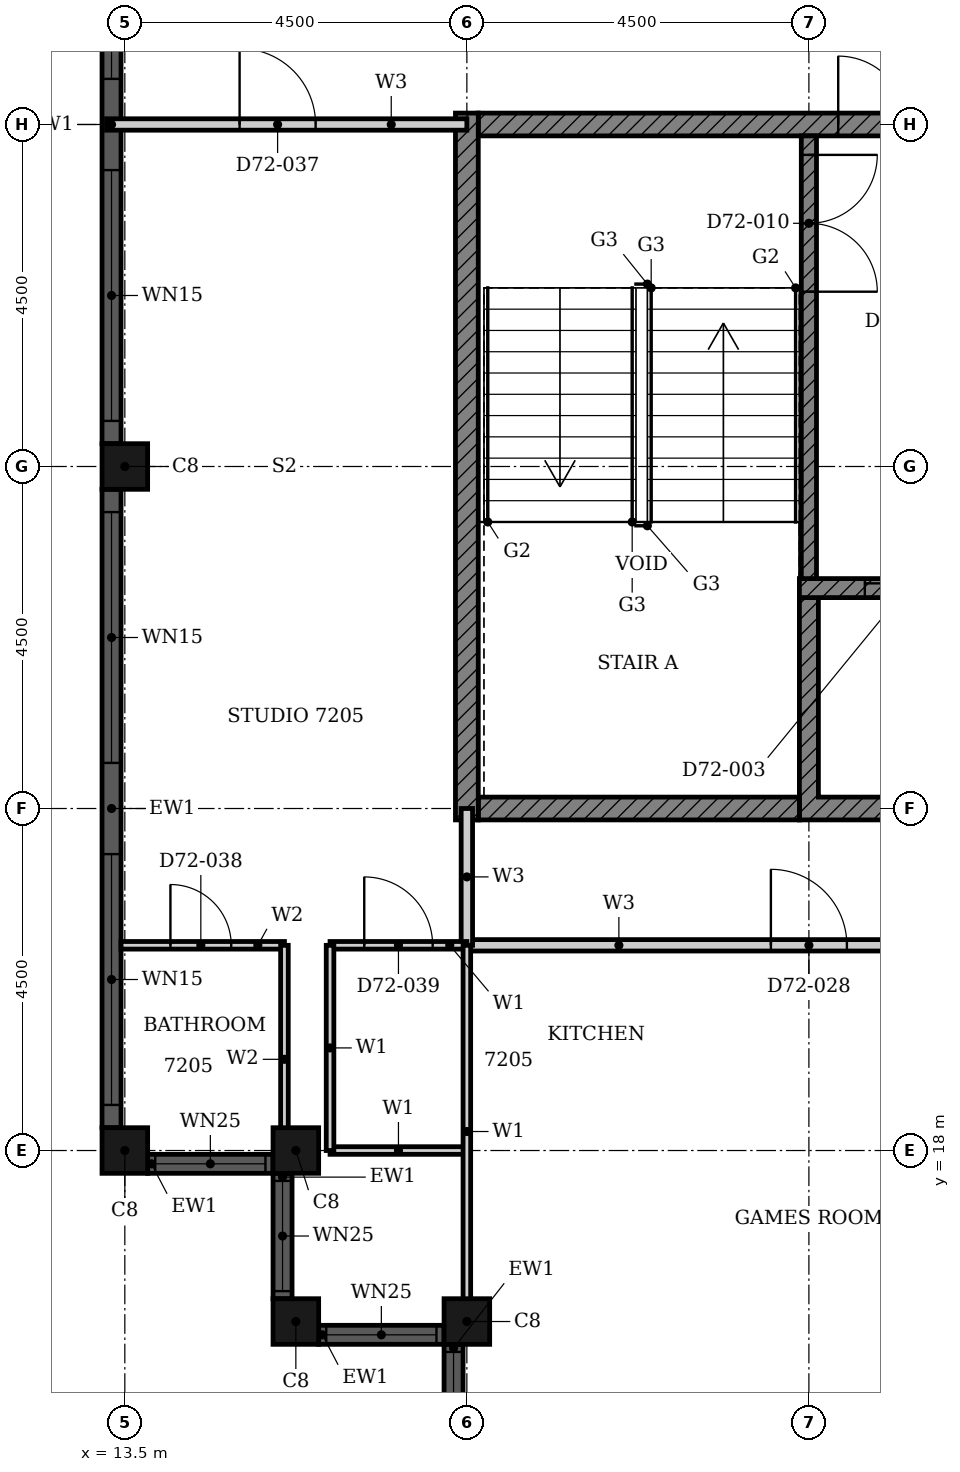
"""IFC4 building model, lengths in metres.
Left out: names, types, materials, properties, quantities, classifications, styles, units other than length and angle.
Written with IfcOpenShell. Run it as: python <this file> out.ifc"""

import sys

from ifc_helpers import new_model, si_unit, direction, frame, frame_2d, origin, origin_2d, place, context, subcontext, project, spatial, polyline, rectangle, hollow_rectangle, outline, extrude, element, fill, save


model = new_model("IFC4")
c1 = context("Model", 3, precision=1e-05, world=origin(), true_north=direction((0.0, 1.0)))
c2 = subcontext(c1, "Body", "Model", "MODEL_VIEW")
j1 = project(units=[si_unit("LENGTHUNIT", "METRE"), si_unit("PLANEANGLEUNIT", "RADIAN")], contexts=[c1])
p1 = place(None, origin())
s1 = spatial("IfcSite", under=j1, at=p1, CompositionType="ELEMENT")
p2 = place(p1, origin())
s2 = spatial("IfcBuilding", under=s1, at=p2, CompositionType="ELEMENT")
p3 = place(p2, frame((0.0, 0.0, 283.4)))
s3 = spatial("IfcBuildingStorey", under=s2, at=p3, CompositionType="ELEMENT", Elevation=283.4)
for number, where, z_axis, x_axis in (
    (1, (13.5, 27.0, 0.0), (0.0, 0.0, 1.0), (1.0, 0.0, 0.0)),
    (2, (13.5, 18.0, 0.0), (0.0, 0.0, 1.0), (1.0, 0.0, 0.0)),
    (3, (15.75, 18.0, 0.0), (0.0, 0.0, 1.0), (1.0, 0.0, 0.0)),
    (4, (15.75, 15.75, 0.0), (0.0, 0.0, 1.0), (1.0, 0.0, 0.0)),
    (5, (18.0, 15.75, 0.0), (0.0, 0.0, 1.0), (1.0, 0.0, 0.0)),
):
    element("IfcColumn", number, at=place(p3, frame(where, z_axis=z_axis, x_axis=x_axis)), inside=s3, PredefinedType="COLUMN", context=c2, shape_type="SweptSolid", body=[
        extrude(hollow_rectangle(XDim=0.6, YDim=0.6, WallThickness=0.02, at=origin_2d()), origin(), (0.0, 0.0, 1.0), 3.7),
    ])
p4 = place(p3, frame((13.325, 35.7, 0.0), z_axis=(0.0, 0.0, 1.0), x_axis=(0.0, -1.0, 0.0)))
e6 = element("IfcWall", 6, at=p4, inside=s3, PredefinedType="SOLIDWALL", context=c2, shape_type="SweptSolid", body=[
    extrude(rectangle(XDim=8.4, YDim=0.25, at=frame_2d((4.2, 0.0))), origin(), (0.0, 0.0, 1.0), 3.7),
])
p5 = place(p4, frame((0.3, 0.0, 0.45)))
e7 = element("IfcOpeningElement", 7, at=p5, cuts=e6, PredefinedType="OPENING", context=c2, shape_type="SweptSolid", body=[
    extrude(rectangle(XDim=3.3, YDim=2.3, at=frame_2d((1.65, 1.15))), frame((0.0, 0.135, 0.0), z_axis=(0.0, -1.0, 0.0), x_axis=(1.0, 0.0, 0.0)), (0.0, 0.0, 1.0), 0.27),
])
p6 = place(p4, frame((4.8, 0.0, 0.45)))
e8 = element("IfcOpeningElement", 8, at=p6, cuts=e6, PredefinedType="OPENING", context=c2, shape_type="SweptSolid", body=[
    extrude(rectangle(XDim=3.3, YDim=2.3, at=frame_2d((1.65, 1.15))), frame((0.0, 0.135, 0.0), z_axis=(0.0, -1.0, 0.0), x_axis=(1.0, 0.0, 0.0)), (0.0, 0.0, 1.0), 0.27),
])
p7 = place(p3, frame((13.325, 26.7, 0.0), z_axis=(0.0, 0.0, 1.0), x_axis=(0.0, -1.0, 0.0)))
e9 = element("IfcWall", 9, at=p7, inside=s3, PredefinedType="SOLIDWALL", context=c2, shape_type="SweptSolid", body=[
    extrude(rectangle(XDim=8.4, YDim=0.25, at=frame_2d((4.2, 0.0))), origin(), (0.0, 0.0, 1.0), 3.7),
])
p8 = place(p7, frame((0.3, 0.0, 0.45)))
e10 = element("IfcOpeningElement", 10, at=p8, cuts=e9, PredefinedType="OPENING", context=c2, shape_type="SweptSolid", body=[
    extrude(rectangle(XDim=3.3, YDim=2.3, at=frame_2d((1.65, 1.15))), frame((0.0, 0.135, 0.0), z_axis=(0.0, -1.0, 0.0), x_axis=(1.0, 0.0, 0.0)), (0.0, 0.0, 1.0), 0.27),
])
p9 = place(p7, frame((4.8, 0.0, 0.45)))
e11 = element("IfcOpeningElement", 11, at=p9, cuts=e9, PredefinedType="OPENING", context=c2, shape_type="SweptSolid", body=[
    extrude(rectangle(XDim=3.3, YDim=2.3, at=frame_2d((1.65, 1.15))), frame((0.0, 0.135, 0.0), z_axis=(0.0, -1.0, 0.0), x_axis=(1.0, 0.0, 0.0)), (0.0, 0.0, 1.0), 0.27),
])
p10 = place(p3, frame((13.8, 17.825, 0.0), z_axis=(0.0, 0.0, 1.0), x_axis=(1.0, 0.0, 0.0)))
e12 = element("IfcWall", 12, at=p10, inside=s3, PredefinedType="SOLIDWALL", context=c2, shape_type="SweptSolid", body=[
    extrude(rectangle(XDim=1.65, YDim=0.25, at=frame_2d((0.825, 0.0))), origin(), (0.0, 0.0, 1.0), 3.7),
])
p11 = place(p10, frame((0.1, 0.0, 0.9)))
e13 = element("IfcOpeningElement", 13, at=p11, cuts=e12, PredefinedType="OPENING", context=c2, shape_type="SweptSolid", body=[
    extrude(rectangle(XDim=1.45, YDim=1.85, at=frame_2d((0.725, 0.925))), frame((0.0, 0.135, 0.0), z_axis=(0.0, -1.0, 0.0), x_axis=(1.0, 0.0, 0.0)), (0.0, 0.0, 1.0), 0.27),
])
p12 = place(p3, frame((15.575, 17.7, 0.0), z_axis=(0.0, 0.0, 1.0), x_axis=(0.0, -1.0, 0.0)))
e14 = element("IfcWall", 14, at=p12, inside=s3, PredefinedType="SOLIDWALL", context=c2, shape_type="SweptSolid", body=[
    extrude(rectangle(XDim=1.65, YDim=0.25, at=frame_2d((0.825, 0.0))), origin(), (0.0, 0.0, 1.0), 3.7),
])
p13 = place(p12, frame((0.1, 0.0, 0.9)))
e15 = element("IfcOpeningElement", 15, at=p13, cuts=e14, PredefinedType="OPENING", context=c2, shape_type="SweptSolid", body=[
    extrude(rectangle(XDim=1.45, YDim=1.85, at=frame_2d((0.725, 0.925))), frame((0.0, 0.135, 0.0), z_axis=(0.0, -1.0, 0.0), x_axis=(1.0, 0.0, 0.0)), (0.0, 0.0, 1.0), 0.27),
])
p14 = place(p3, frame((16.05, 15.575, 0.0), z_axis=(0.0, 0.0, 1.0), x_axis=(1.0, 0.0, 0.0)))
e16 = element("IfcWall", 16, at=p14, inside=s3, PredefinedType="SOLIDWALL", context=c2, shape_type="SweptSolid", body=[
    extrude(rectangle(XDim=1.65, YDim=0.25, at=frame_2d((0.825, 0.0))), origin(), (0.0, 0.0, 1.0), 3.7),
])
p15 = place(p14, frame((0.1, 0.0, 0.9)))
e17 = element("IfcOpeningElement", 17, at=p15, cuts=e16, PredefinedType="OPENING", context=c2, shape_type="SweptSolid", body=[
    extrude(rectangle(XDim=1.45, YDim=1.85, at=frame_2d((0.725, 0.925))), frame((0.0, 0.135, 0.0), z_axis=(0.0, -1.0, 0.0), x_axis=(1.0, 0.0, 0.0)), (0.0, 0.0, 1.0), 0.27),
])
p16 = place(p3, frame((17.825, 15.45, 0.0), z_axis=(0.0, 0.0, 1.0), x_axis=(0.0, -1.0, 0.0)))
e18 = element("IfcWall", 18, at=p16, inside=s3, PredefinedType="SOLIDWALL", context=c2, shape_type="SweptSolid", body=[
    extrude(rectangle(XDim=1.65, YDim=0.25, at=frame_2d((0.825, 0.0))), origin(), (0.0, 0.0, 1.0), 3.7),
])
p17 = place(p16, frame((0.1, 0.0, 0.9)))
e19 = element("IfcOpeningElement", 19, at=p17, cuts=e18, PredefinedType="OPENING", context=c2, shape_type="SweptSolid", body=[
    extrude(rectangle(XDim=1.45, YDim=1.85, at=frame_2d((0.725, 0.925))), frame((0.0, 0.135, 0.0), z_axis=(0.0, -1.0, 0.0), x_axis=(1.0, 0.0, 0.0)), (0.0, 0.0, 1.0), 0.27),
])
p18 = place(p3, origin())
e20 = element("IfcWall", 20, at=p18, inside=s3, PredefinedType="SHEAR", context=c2, shape_type="SweptSolid", body=[
    extrude(outline(polyline([(22.375, 22.35), (25.197, 22.35), (25.197, 25.275), (24.947, 25.275), (24.947, 22.65), (22.625, 22.65), (22.625, 25.275), (22.375, 25.275), (22.375, 22.35)])), origin(), (0.0, 0.0, 1.0), 3.4),
])
p19 = place(p3, frame((18.15, 22.5, 0.0), z_axis=(0.0, 0.0, 1.0), x_axis=(1.0, 0.0, 0.0)))
e21 = element("IfcWall", 21, at=p19, inside=s3, PredefinedType="SHEAR", context=c2, shape_type="SweptSolid", body=[
    extrude(rectangle(XDim=4.225, YDim=0.3, at=frame_2d((2.113, 0.0))), origin(), (0.0, 0.0, 1.0), 3.4),
])
p20 = place(p3, frame((18.15, 31.5, 0.0), z_axis=(0.0, 0.0, 1.0), x_axis=(1.0, 0.0, 0.0)))
e22 = element("IfcWall", 22, at=p20, inside=s3, PredefinedType="SHEAR", context=c2, shape_type="SweptSolid", body=[
    extrude(rectangle(XDim=9.368, YDim=0.3, at=frame_2d((4.684, 0.0))), origin(), (0.0, 0.0, 1.0), 3.4),
])
p21 = place(p20, frame((4.736, 0.0, 0.0)))
e23 = element("IfcOpeningElement", 23, at=p21, cuts=e22, PredefinedType="OPENING", context=c2, shape_type="SweptSolid", body=[
    extrude(rectangle(XDim=1.8, YDim=2.1, at=frame_2d((0.9, 1.05))), frame((0.0, 0.16, 0.0), z_axis=(0.0, -1.0, 0.0), x_axis=(1.0, 0.0, 0.0)), (0.0, 0.0, 1.0), 0.32),
])
p22 = place(p3, frame((18.0, 22.35, 0.0), z_axis=(0.0, 0.0, 1.0), x_axis=(0.0, 1.0, 0.0)))
e24 = element("IfcWall", 24, at=p22, inside=s3, PredefinedType="SHEAR", context=c2, shape_type="SweptSolid", body=[
    extrude(rectangle(XDim=9.3, YDim=0.3, at=frame_2d((4.65, 0.0))), origin(), (0.0, 0.0, 1.0), 3.4),
])
p23 = place(p3, frame((22.375, 25.4, 0.0), z_axis=(0.0, 0.0, 1.0), x_axis=(1.0, 0.0, 0.0)))
e25 = element("IfcWall", 25, at=p23, inside=s3, PredefinedType="SHEAR", context=c2, shape_type="SweptSolid", body=[
    extrude(rectangle(XDim=15.678, YDim=0.25, at=frame_2d((7.839, 0.0))), origin(), (0.0, 0.0, 1.0), 3.4),
])
p24 = place(p23, frame((6.004, 0.0, 0.0)))
e26 = element("IfcOpeningElement", 26, at=p24, cuts=e25, PredefinedType="OPENING", context=c2, shape_type="SweptSolid", body=[
    extrude(rectangle(XDim=1.1, YDim=2.1, at=frame_2d((0.55, 1.05))), frame((0.0, 0.135, 0.0), z_axis=(0.0, -1.0, 0.0), x_axis=(1.0, 0.0, 0.0)), (0.0, 0.0, 1.0), 0.27),
])
p25 = place(p23, frame((0.861, 0.0, 0.0)))
e27 = element("IfcOpeningElement", 27, at=p25, cuts=e25, PredefinedType="OPENING", context=c2, shape_type="SweptSolid", body=[
    extrude(rectangle(XDim=1.1, YDim=2.1, at=frame_2d((0.55, 1.05))), frame((0.0, 0.135, 0.0), z_axis=(0.0, -1.0, 0.0), x_axis=(1.0, 0.0, 0.0)), (0.0, 0.0, 1.0), 0.27),
])
p26 = place(p23, frame((3.532, 0.0, 0.0)))
e28 = element("IfcOpeningElement", 28, at=p26, cuts=e25, PredefinedType="OPENING", context=c2, shape_type="SweptSolid", body=[
    extrude(rectangle(XDim=0.9, YDim=2.1, at=frame_2d((0.45, 1.05))), frame((0.0, 0.135, 0.0), z_axis=(0.0, -1.0, 0.0), x_axis=(1.0, 0.0, 0.0)), (0.0, 0.0, 1.0), 0.27),
])
p27 = place(p23, frame((11.246, 0.0, 0.0)))
e29 = element("IfcOpeningElement", 29, at=p27, cuts=e25, PredefinedType="OPENING", context=c2, shape_type="SweptSolid", body=[
    extrude(rectangle(XDim=0.9, YDim=2.1, at=frame_2d((0.45, 1.05))), frame((0.0, 0.135, 0.0), z_axis=(0.0, -1.0, 0.0), x_axis=(1.0, 0.0, 0.0)), (0.0, 0.0, 1.0), 0.27),
])
p28 = place(p3, frame((22.5, 31.35, 0.0), z_axis=(0.0, 0.0, 1.0), x_axis=(0.0, -1.0, 0.0)))
e30 = element("IfcWall", 30, at=p28, inside=s3, PredefinedType="SHEAR", context=c2, shape_type="SweptSolid", body=[
    extrude(rectangle(XDim=5.825, YDim=0.2, at=frame_2d((2.913, 0.0))), origin(), (0.0, 0.0, 1.0), 3.4),
])
p29 = place(p28, frame((0.25, 0.0, 0.0)))
e31 = element("IfcOpeningElement", 31, at=p29, cuts=e30, PredefinedType="OPENING", context=c2, shape_type="SweptSolid", body=[
    extrude(rectangle(XDim=1.8, YDim=2.1, at=frame_2d((0.9, 1.05))), frame((0.0, 0.11, 0.0), z_axis=(0.0, -1.0, 0.0), x_axis=(1.0, 0.0, 0.0)), (0.0, 0.0, 1.0), 0.22),
])
p30 = place(p3, frame((18.0, 20.7, 0.0), z_axis=(0.0, 0.0, 1.0), x_axis=(1.0, 0.0, 0.0)))
e32 = element("IfcWall", 32, at=p30, inside=s3, PredefinedType="PARTITIONING", context=c2, shape_type="SweptSolid", body=[
    extrude(rectangle(XDim=9.0, YDim=0.15, at=frame_2d((4.5, 0.0))), origin(), (0.0, 0.0, 1.0), 3.4),
])
p31 = place(p30, frame((4.0, 0.0, 0.0)))
e33 = element("IfcOpeningElement", 33, at=p31, cuts=e32, PredefinedType="OPENING", context=c2, shape_type="SweptSolid", body=[
    extrude(rectangle(XDim=1.0, YDim=2.1, at=frame_2d((0.5, 1.05))), frame((0.0, 0.085, 0.0), z_axis=(0.0, -1.0, 0.0), x_axis=(1.0, 0.0, 0.0)), (0.0, 0.0, 1.0), 0.17),
])
p32 = place(p3, frame((13.26, 31.5, 0.0), z_axis=(0.0, 0.0, 1.0), x_axis=(1.0, 0.0, 0.0)))
e34 = element("IfcWall", 34, at=p32, inside=s3, PredefinedType="PARTITIONING", context=c2, shape_type="SweptSolid", body=[
    extrude(rectangle(XDim=4.74, YDim=0.15, at=frame_2d((2.37, 0.0))), origin(), (0.0, 0.0, 1.0), 3.4),
])
p33 = place(p32, frame((1.75, 0.0, 0.0)))
e35 = element("IfcOpeningElement", 35, at=p33, cuts=e34, PredefinedType="OPENING", context=c2, shape_type="SweptSolid", body=[
    extrude(rectangle(XDim=1.0, YDim=2.2, at=frame_2d((0.5, 1.1))), frame((0.0, 0.085, 0.0), z_axis=(0.0, -1.0, 0.0), x_axis=(1.0, 0.0, 0.0)), (0.0, 0.0, 1.0), 0.17),
])
p34 = place(p3, frame((18.0, 20.7, 0.0), z_axis=(0.0, 0.0, 1.0), x_axis=(0.0, 1.0, 0.0)))
e36 = element("IfcWall", 36, at=p34, inside=s3, PredefinedType="PARTITIONING", context=c2, shape_type="SweptSolid", body=[
    extrude(rectangle(XDim=1.8, YDim=0.15, at=frame_2d((0.9, 0.0))), origin(), (0.0, 0.0, 1.0), 3.4),
])
p35 = place(p3, frame((16.2, 18.0, 0.0), z_axis=(0.0, 0.0, 1.0), x_axis=(1.0, 0.0, 0.0)))
e37 = element("IfcWall", 37, at=p35, inside=s3, PredefinedType="PARTITIONING", context=c2, shape_type="SweptSolid", body=[
    extrude(rectangle(XDim=1.8, YDim=0.1, at=frame_2d((0.9, 0.0))), origin(), (0.0, 0.0, 1.0), 3.4),
])
p36 = place(p3, frame((16.2, 20.7, 0.0), z_axis=(0.0, 0.0, 1.0), x_axis=(1.0, 0.0, 0.0)))
e38 = element("IfcWall", 38, at=p36, inside=s3, PredefinedType="PARTITIONING", context=c2, shape_type="SweptSolid", body=[
    extrude(rectangle(XDim=1.8, YDim=0.1, at=frame_2d((0.9, 0.0))), origin(), (0.0, 0.0, 1.0), 3.4),
])
p37 = place(p36, frame((0.45, 0.0, 0.0)))
e39 = element("IfcOpeningElement", 39, at=p37, cuts=e38, PredefinedType="OPENING", context=c2, shape_type="SweptSolid", body=[
    extrude(rectangle(XDim=0.9, YDim=2.1, at=frame_2d((0.45, 1.05))), frame((0.0, 0.06, 0.0), z_axis=(0.0, -1.0, 0.0), x_axis=(1.0, 0.0, 0.0)), (0.0, 0.0, 1.0), 0.12),
])
p38 = place(p3, frame((16.2, 18.0, 0.0), z_axis=(0.0, 0.0, 1.0), x_axis=(0.0, 1.0, 0.0)))
e40 = element("IfcWall", 40, at=p38, inside=s3, PredefinedType="PARTITIONING", context=c2, shape_type="SweptSolid", body=[
    extrude(rectangle(XDim=2.7, YDim=0.1, at=frame_2d((1.35, 0.0))), origin(), (0.0, 0.0, 1.0), 3.4),
])
p39 = place(p3, frame((18.0, 15.8, 0.0), z_axis=(0.0, 0.0, 1.0), x_axis=(0.0, 1.0, 0.0)))
e41 = element("IfcWall", 41, at=p39, inside=s3, PredefinedType="PARTITIONING", context=c2, shape_type="SweptSolid", body=[
    extrude(rectangle(XDim=4.9, YDim=0.1, at=frame_2d((2.45, 0.0))), origin(), (0.0, 0.0, 1.0), 3.4),
])
p40 = place(p3, frame((13.45, 20.7, 0.0), z_axis=(0.0, 0.0, 1.0), x_axis=(1.0, 0.0, 0.0)))
e42 = element("IfcWall", 42, at=p40, inside=s3, PredefinedType="PARTITIONING", context=c2, shape_type="SweptSolid", body=[
    extrude(rectangle(XDim=2.15, YDim=0.1, at=frame_2d((1.075, 0.0))), origin(), (0.0, 0.0, 1.0), 3.4),
])
p41 = place(p40, frame((0.65, 0.0, 0.0)))
e43 = element("IfcOpeningElement", 43, at=p41, cuts=e42, PredefinedType="OPENING", context=c2, shape_type="SweptSolid", body=[
    extrude(rectangle(XDim=0.8, YDim=2.1, at=frame_2d((0.4, 1.05))), frame((0.0, 0.06, 0.0), z_axis=(0.0, -1.0, 0.0), x_axis=(1.0, 0.0, 0.0)), (0.0, 0.0, 1.0), 0.12),
])
p42 = place(p3, frame((15.6, 17.7, 0.0), z_axis=(0.0, 0.0, 1.0), x_axis=(0.0, 1.0, 0.0)))
e44 = element("IfcWall", 44, at=p42, inside=s3, PredefinedType="PARTITIONING", context=c2, shape_type="SweptSolid", body=[
    extrude(rectangle(XDim=3.0, YDim=0.1, at=frame_2d((1.5, 0.0))), origin(), (0.0, 0.0, 1.0), 3.4),
])
p43 = place(p5, origin())
e45 = element("IfcWindow", 45, at=p43, inside=s3, PartitioningType="SINGLE_PANEL", PredefinedType="WINDOW", context=c2, shape_type="SweptSolid", body=[
    extrude(rectangle(XDim=3.3, YDim=2.3, at=frame_2d((1.65, 1.15))), frame((0.0, 0.03, 0.0), z_axis=(0.0, -1.0, 0.0), x_axis=(1.0, 0.0, 0.0)), (0.0, 0.0, 1.0), 0.06),
])
fill(e7, e45)
p44 = place(p6, origin())
e46 = element("IfcWindow", 46, at=p44, inside=s3, PartitioningType="SINGLE_PANEL", PredefinedType="WINDOW", context=c2, shape_type="SweptSolid", body=[
    extrude(rectangle(XDim=3.3, YDim=2.3, at=frame_2d((1.65, 1.15))), frame((0.0, 0.03, 0.0), z_axis=(0.0, -1.0, 0.0), x_axis=(1.0, 0.0, 0.0)), (0.0, 0.0, 1.0), 0.06),
])
fill(e8, e46)
p45 = place(p8, origin())
e47 = element("IfcWindow", 47, at=p45, inside=s3, PartitioningType="SINGLE_PANEL", PredefinedType="WINDOW", context=c2, shape_type="SweptSolid", body=[
    extrude(rectangle(XDim=3.3, YDim=2.3, at=frame_2d((1.65, 1.15))), frame((0.0, 0.03, 0.0), z_axis=(0.0, -1.0, 0.0), x_axis=(1.0, 0.0, 0.0)), (0.0, 0.0, 1.0), 0.06),
])
fill(e10, e47)
p46 = place(p9, origin())
e48 = element("IfcWindow", 48, at=p46, inside=s3, PartitioningType="SINGLE_PANEL", PredefinedType="WINDOW", context=c2, shape_type="SweptSolid", body=[
    extrude(rectangle(XDim=3.3, YDim=2.3, at=frame_2d((1.65, 1.15))), frame((0.0, 0.03, 0.0), z_axis=(0.0, -1.0, 0.0), x_axis=(1.0, 0.0, 0.0)), (0.0, 0.0, 1.0), 0.06),
])
fill(e11, e48)
p47 = place(p11, origin())
e49 = element("IfcWindow", 49, at=p47, inside=s3, PartitioningType="SINGLE_PANEL", PredefinedType="WINDOW", context=c2, shape_type="SweptSolid", body=[
    extrude(rectangle(XDim=1.45, YDim=1.85, at=frame_2d((0.725, 0.925))), frame((0.0, 0.03, 0.0), z_axis=(0.0, -1.0, 0.0), x_axis=(1.0, 0.0, 0.0)), (0.0, 0.0, 1.0), 0.06),
])
fill(e13, e49)
p48 = place(p13, origin())
e50 = element("IfcWindow", 50, at=p48, inside=s3, PartitioningType="SINGLE_PANEL", PredefinedType="WINDOW", context=c2, shape_type="SweptSolid", body=[
    extrude(rectangle(XDim=1.45, YDim=1.85, at=frame_2d((0.725, 0.925))), frame((0.0, 0.03, 0.0), z_axis=(0.0, -1.0, 0.0), x_axis=(1.0, 0.0, 0.0)), (0.0, 0.0, 1.0), 0.06),
])
fill(e15, e50)
p49 = place(p15, origin())
e51 = element("IfcWindow", 51, at=p49, inside=s3, PartitioningType="SINGLE_PANEL", PredefinedType="WINDOW", context=c2, shape_type="SweptSolid", body=[
    extrude(rectangle(XDim=1.45, YDim=1.85, at=frame_2d((0.725, 0.925))), frame((0.0, 0.03, 0.0), z_axis=(0.0, -1.0, 0.0), x_axis=(1.0, 0.0, 0.0)), (0.0, 0.0, 1.0), 0.06),
])
fill(e17, e51)
p50 = place(p17, origin())
e52 = element("IfcWindow", 52, at=p50, inside=s3, PartitioningType="SINGLE_PANEL", PredefinedType="WINDOW", context=c2, shape_type="SweptSolid", body=[
    extrude(rectangle(XDim=1.45, YDim=1.85, at=frame_2d((0.725, 0.925))), frame((0.0, 0.03, 0.0), z_axis=(0.0, -1.0, 0.0), x_axis=(1.0, 0.0, 0.0)), (0.0, 0.0, 1.0), 0.06),
])
fill(e19, e52)
p51 = place(p25, origin())
e53 = element("IfcDoor", 53, at=p51, inside=s3, OperationType="DOUBLE_DOOR_SLIDING", PredefinedType="DOOR", context=c2, shape_type="SweptSolid", body=[
    extrude(rectangle(XDim=1.1, YDim=2.1, at=frame_2d((0.55, 1.05))), frame((0.0, 0.025, 0.0), z_axis=(0.0, -1.0, 0.0), x_axis=(1.0, 0.0, 0.0)), (0.0, 0.0, 1.0), 0.05),
])
fill(e27, e53)
p52 = place(p29, origin())
e54 = element("IfcDoor", 54, at=p52, inside=s3, OperationType="DOUBLE_DOOR_SINGLE_SWING", PredefinedType="DOOR", context=c2, shape_type="SweptSolid", body=[
    extrude(rectangle(XDim=1.8, YDim=2.1, at=frame_2d((0.9, 1.05))), frame((0.0, 0.025, 0.0), z_axis=(0.0, -1.0, 0.0), x_axis=(1.0, 0.0, 0.0)), (0.0, 0.0, 1.0), 0.05),
])
fill(e31, e54)
p53 = place(p21, origin())
e55 = element("IfcDoor", 55, at=p53, inside=s3, OperationType="DOUBLE_DOOR_SINGLE_SWING", PredefinedType="DOOR", context=c2, shape_type="SweptSolid", body=[
    extrude(rectangle(XDim=1.8, YDim=2.1, at=frame_2d((0.9, 1.05))), frame((0.0, 0.025, 0.0), z_axis=(0.0, -1.0, 0.0), x_axis=(1.0, 0.0, 0.0)), (0.0, 0.0, 1.0), 0.05),
])
fill(e23, e55)
p54 = place(p31, origin())
e56 = element("IfcDoor", 56, at=p54, inside=s3, OperationType="SINGLE_SWING_RIGHT", PredefinedType="DOOR", context=c2, shape_type="SweptSolid", body=[
    extrude(rectangle(XDim=1.0, YDim=2.1, at=frame_2d((0.5, 1.05))), frame((0.0, 0.025, 0.0), z_axis=(0.0, -1.0, 0.0), x_axis=(1.0, 0.0, 0.0)), (0.0, 0.0, 1.0), 0.05),
])
fill(e33, e56)
p55 = place(p33, origin())
e57 = element("IfcDoor", 57, at=p55, inside=s3, OperationType="SINGLE_SWING_LEFT", PredefinedType="DOOR", context=c2, shape_type="SweptSolid", body=[
    extrude(rectangle(XDim=1.0, YDim=2.2, at=frame_2d((0.5, 1.1))), frame((0.0, 0.025, 0.0), z_axis=(0.0, -1.0, 0.0), x_axis=(1.0, 0.0, 0.0)), (0.0, 0.0, 1.0), 0.05),
])
fill(e35, e57)
p56 = place(p41, origin())
e58 = element("IfcDoor", 58, at=p56, inside=s3, OperationType="SINGLE_SWING_RIGHT", PredefinedType="DOOR", context=c2, shape_type="SweptSolid", body=[
    extrude(rectangle(XDim=0.8, YDim=2.1, at=frame_2d((0.4, 1.05))), frame((0.0, 0.025, 0.0), z_axis=(0.0, -1.0, 0.0), x_axis=(1.0, 0.0, 0.0)), (0.0, 0.0, 1.0), 0.05),
])
fill(e43, e58)
p57 = place(p37, origin())
e59 = element("IfcDoor", 59, at=p57, inside=s3, OperationType="SINGLE_SWING_RIGHT", PredefinedType="DOOR", context=c2, shape_type="SweptSolid", body=[
    extrude(rectangle(XDim=0.9, YDim=2.1, at=frame_2d((0.45, 1.05))), frame((0.0, 0.025, 0.0), z_axis=(0.0, -1.0, 0.0), x_axis=(1.0, 0.0, 0.0)), (0.0, 0.0, 1.0), 0.05),
])
fill(e39, e59)
save(model, sys.argv[1])
